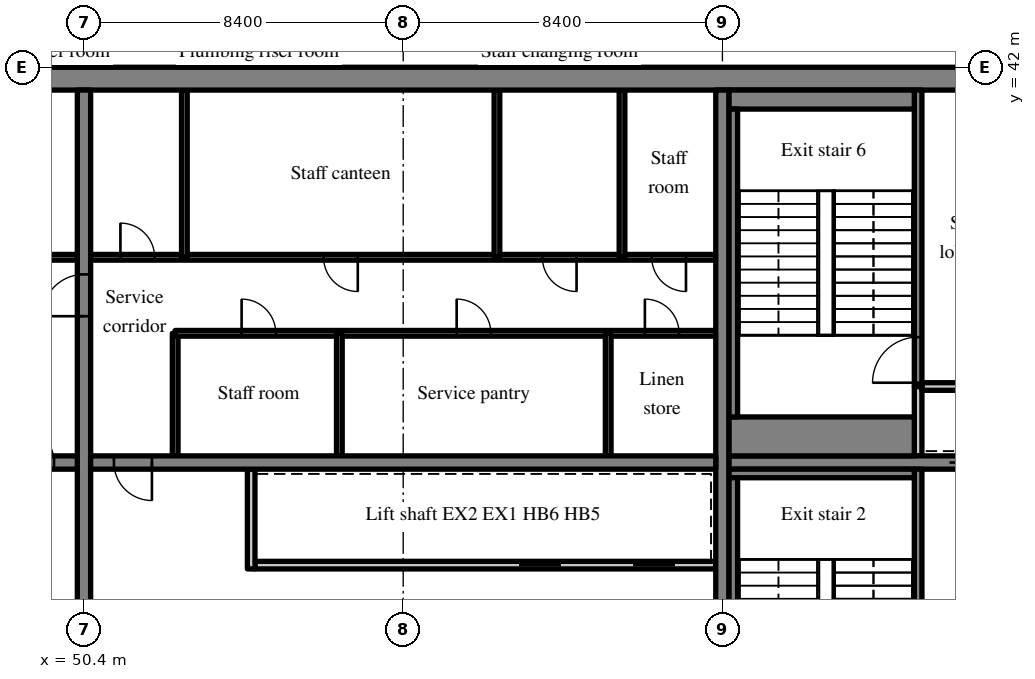
"""IFC4 building model, lengths in metres.
Left out: names, types, materials, properties, quantities, classifications, styles, units other than length and angle.
Written with IfcOpenShell. Run it as: python <this file> out.ifc"""

import sys

from ifc_helpers import new_model, si_unit, direction, frame, frame_2d, origin, place, context, subcontext, project, spatial, rectangle, extrude, source, transform, mapped, element, fill, save


model = new_model("IFC4")
c1 = context("Model", 3, precision=1e-05, world=origin(), true_north=direction((0.0, 1.0)))
c2 = subcontext(c1, "Body", "Model", "MODEL_VIEW")
j1 = project(units=[si_unit("LENGTHUNIT", "METRE"), si_unit("PLANEANGLEUNIT", "RADIAN")], contexts=[c1])
p1 = place(None, origin())
s1 = spatial("IfcSite", under=j1, at=p1, CompositionType="ELEMENT")
p2 = place(p1, origin())
s2 = spatial("IfcBuilding", under=s1, at=p2, CompositionType="ELEMENT")
p3 = place(p2, frame((0.0, 0.0, 260.8)))
s3 = spatial("IfcBuildingStorey", under=s2, at=p3, CompositionType="ELEMENT", Elevation=260.8)
m1 = source(origin(), c2, "Body", "SweptSolid", [
    extrude(rectangle(XDim=50.4, YDim=0.6, at=frame_2d((25.2, 0.0))), origin(), (0.0, 0.0, 1.0), 3.62),
])
p4 = place(p3, frame((25.2, 41.7, 0.0), z_axis=(0.0, 0.0, 1.0), x_axis=(1.0, 0.0, 0.0)))
e1 = element("IfcWall", 1, at=p4, inside=s3, PredefinedType="SHEAR", context=c2, shape_type="MappedRepresentation", body=[
    mapped(m1, transform((0.0, 0.0, 0.0), scale=1.0)),
])
m2 = source(origin(), c2, "Body", "SweptSolid", [
    extrude(rectangle(XDim=18.8, YDim=0.35, at=frame_2d((9.4, 0.0))), origin(), (0.0, 0.0, 1.0), 3.62),
])
p5 = place(p3, frame((50.4, 22.6, 0.0), z_axis=(0.0, 0.0, 1.0), x_axis=(0.0, 1.0, 0.0)))
e2 = element("IfcWall", 2, at=p5, inside=s3, PredefinedType="SHEAR", context=c2, shape_type="MappedRepresentation", body=[
    mapped(m2, transform((0.0, 0.0, 0.0), scale=1.0)),
])
m3 = source(origin(), c2, "Body", "SweptSolid", [
    extrude(rectangle(XDim=1.1, YDim=2.1, at=frame_2d((0.55, 1.05))), frame((0.0, 0.185, 0.0), z_axis=(0.0, -1.0, 0.0), x_axis=(1.0, 0.0, 0.0)), (0.0, 0.0, 1.0), 0.37),
])
p6 = place(p5, frame((12.85, 0.0, 0.0)))
e3 = element("IfcOpeningElement", 3, at=p6, cuts=e2, PredefinedType="OPENING", context=c2, shape_type="MappedRepresentation", body=[
    mapped(m3, transform((0.0, 0.0, 0.0), scale=1.0)),
])
p7 = place(p3, frame((67.2, 22.6, 0.0), z_axis=(0.0, 0.0, 1.0), x_axis=(0.0, 1.0, 0.0)))
e4 = element("IfcWall", 4, at=p7, inside=s3, PredefinedType="SHEAR", context=c2, shape_type="MappedRepresentation", body=[
    mapped(m2, transform((0.0, 0.0, 0.0), scale=1.0)),
])
m4 = source(origin(), c2, "Body", "SweptSolid", [
    extrude(rectangle(XDim=16.45, YDim=0.35, at=frame_2d((8.225, 0.0))), origin(), (0.0, 0.0, 1.0), 3.62),
])
p8 = place(p3, frame((33.775, 31.6, 0.0), z_axis=(0.0, 0.0, 1.0), x_axis=(1.0, 0.0, 0.0)))
e5 = element("IfcWall", 5, at=p8, inside=s3, PredefinedType="SHEAR", context=c2, shape_type="MappedRepresentation", body=[
    mapped(m4, transform((0.0, 0.0, 0.0), scale=1.0)),
])
m5 = source(origin(), c2, "Body", "SweptSolid", [
    extrude(rectangle(XDim=1.0, YDim=2.1, at=frame_2d((0.5, 1.05))), frame((0.0, 0.185, 0.0), z_axis=(0.0, -1.0, 0.0), x_axis=(1.0, 0.0, 0.0)), (0.0, 0.0, 1.0), 0.37),
])
p9 = place(p8, frame((14.837, 0.0, 0.0)))
e6 = element("IfcOpeningElement", 6, at=p9, cuts=e5, PredefinedType="OPENING", context=c2, shape_type="MappedRepresentation", body=[
    mapped(m5, transform((0.0, 0.0, 0.0), scale=1.0)),
])
m6 = source(origin(), c2, "Body", "SweptSolid", [
    extrude(rectangle(XDim=16.45, YDim=0.35, at=frame_2d((8.225, 0.0))), origin(), (0.0, 0.0, 1.0), 3.62),
])
p10 = place(p3, frame((50.575, 31.6, 0.0), z_axis=(0.0, 0.0, 1.0), x_axis=(1.0, 0.0, 0.0)))
e7 = element("IfcWall", 7, at=p10, inside=s3, PredefinedType="SHEAR", context=c2, shape_type="MappedRepresentation", body=[
    mapped(m6, transform((0.0, 0.0, 0.0), scale=1.0)),
])
p11 = place(p10, frame((0.613, 0.0, 0.0)))
e8 = element("IfcOpeningElement", 8, at=p11, cuts=e7, PredefinedType="OPENING", context=c2, shape_type="MappedRepresentation", body=[
    mapped(m5, transform((0.0, 0.0, 0.0), scale=1.0)),
])
m7 = source(origin(), c2, "Body", "SweptSolid", [
    extrude(rectangle(XDim=7.625, YDim=0.35, at=frame_2d((3.812, 0.0))), origin(), (0.0, 0.0, 1.0), 3.62),
])
p12 = place(p3, frame((67.375, 31.6, 0.0), z_axis=(0.0, 0.0, 1.0), x_axis=(1.0, 0.0, 0.0)))
e9 = element("IfcWall", 9, at=p12, inside=s3, PredefinedType="SHEAR", context=c2, shape_type="MappedRepresentation", body=[
    mapped(m7, transform((0.0, 0.0, 0.0), scale=1.0)),
])
p13 = place(p12, frame((5.8, 0.0, 0.0)))
e10 = element("IfcOpeningElement", 10, at=p13, cuts=e9, PredefinedType="OPENING", context=c2, shape_type="MappedRepresentation", body=[
    mapped(m3, transform((0.0, 0.0, 0.0), scale=1.0)),
])
m8 = source(origin(), c2, "Body", "SweptSolid", [
    extrude(rectangle(XDim=16.45, YDim=0.15, at=frame_2d((8.225, 0.0))), origin(), (0.0, 0.0, 1.0), 3.62),
])
p14 = place(p3, frame((33.775, 37.0, 0.0), z_axis=(0.0, 0.0, 1.0), x_axis=(1.0, 0.0, 0.0)))
e11 = element("IfcWall", 11, at=p14, inside=s3, PredefinedType="PARTITIONING", context=c2, shape_type="MappedRepresentation", body=[
    mapped(m8, transform((0.0, 0.0, 0.0), scale=1.0)),
])
m9 = source(origin(), c2, "Body", "SweptSolid", [
    extrude(rectangle(XDim=0.9, YDim=2.1, at=frame_2d((0.45, 1.05))), frame((0.0, 0.085, 0.0), z_axis=(0.0, -1.0, 0.0), x_axis=(1.0, 0.0, 0.0)), (0.0, 0.0, 1.0), 0.17),
])
p15 = place(p14, frame((3.251, 0.0, 0.0)))
e12 = element("IfcOpeningElement", 12, at=p15, cuts=e11, PredefinedType="OPENING", context=c2, shape_type="MappedRepresentation", body=[
    mapped(m9, transform((0.0, 0.0, 0.0), scale=1.0)),
])
p16 = place(p14, frame((8.186, 0.0, 0.0)))
e13 = element("IfcOpeningElement", 13, at=p16, cuts=e11, PredefinedType="OPENING", context=c2, shape_type="MappedRepresentation", body=[
    mapped(m9, transform((0.0, 0.0, 0.0), scale=1.0)),
])
p17 = place(p14, frame((11.476, 0.0, 0.0)))
e14 = element("IfcOpeningElement", 14, at=p17, cuts=e11, PredefinedType="OPENING", context=c2, shape_type="MappedRepresentation", body=[
    mapped(m9, transform((0.0, 0.0, 0.0), scale=1.0)),
])
p18 = place(p14, frame((14.766, 0.0, 0.0)))
e15 = element("IfcOpeningElement", 15, at=p18, cuts=e11, PredefinedType="OPENING", context=c2, shape_type="MappedRepresentation", body=[
    mapped(m9, transform((0.0, 0.0, 0.0), scale=1.0)),
])
m10 = source(origin(), c2, "Body", "SweptSolid", [
    extrude(rectangle(XDim=12.125, YDim=0.2, at=frame_2d((6.062, 0.0))), origin(), (0.0, 0.0, 1.0), 3.62),
])
p19 = place(p3, frame((67.025, 28.9, 0.0), z_axis=(0.0, 0.0, 1.0), x_axis=(-1.0, 0.0, 0.0)))
e16 = element("IfcWall", 16, at=p19, inside=s3, PredefinedType="SOLIDWALL", context=c2, shape_type="MappedRepresentation", body=[
    mapped(m10, transform((0.0, 0.0, 0.0), scale=1.0)),
])
m11 = source(origin(), c2, "Body", "SweptSolid", [
    extrude(rectangle(XDim=1.1, YDim=2.1, at=frame_2d((0.55, 1.05))), frame((0.0, 0.11, 0.0), z_axis=(0.0, -1.0, 0.0), x_axis=(1.0, 0.0, 0.0)), (0.0, 0.0, 1.0), 0.22),
])
p20 = place(p19, frame((1.075, 0.0, 0.0)))
e17 = element("IfcOpeningElement", 17, at=p20, cuts=e16, PredefinedType="OPENING", context=c2, shape_type="MappedRepresentation", body=[
    mapped(m11, transform((0.0, 0.0, 0.0), scale=1.0)),
])
p21 = place(p19, frame((4.075, 0.0, 0.0)))
e18 = element("IfcOpeningElement", 18, at=p21, cuts=e16, PredefinedType="OPENING", context=c2, shape_type="MappedRepresentation", body=[
    mapped(m11, transform((0.0, 0.0, 0.0), scale=1.0)),
])
m12 = source(origin(), c2, "Body", "SweptSolid", [
    extrude(rectangle(XDim=2.625, YDim=0.2, at=frame_2d((1.312, 0.0))), origin(), (0.0, 0.0, 1.0), 3.62),
])
p22 = place(p3, frame((54.8, 28.8, 0.0), z_axis=(0.0, 0.0, 1.0), x_axis=(0.0, 1.0, 0.0)))
e19 = element("IfcWall", 19, at=p22, inside=s3, PredefinedType="SOLIDWALL", context=c2, shape_type="MappedRepresentation", body=[
    mapped(m12, transform((0.0, 0.0, 0.0), scale=1.0)),
])
m13 = source(origin(), c2, "Body", "SweptSolid", [
    extrude(rectangle(XDim=3.225, YDim=0.15, at=frame_2d((1.613, 0.0))), origin(), (0.0, 0.0, 1.0), 3.62),
])
p23 = place(p3, frame((52.8, 31.775, 0.0), z_axis=(0.0, 0.0, 1.0), x_axis=(0.0, 1.0, 0.0)))
e20 = element("IfcWall", 20, at=p23, inside=s3, PredefinedType="PARTITIONING", context=c2, shape_type="MappedRepresentation", body=[
    mapped(m13, transform((0.0, 0.0, 0.0), scale=1.0)),
])
m14 = source(origin(), c2, "Body", "SweptSolid", [
    extrude(rectangle(XDim=14.225, YDim=0.15, at=frame_2d((7.112, 0.0))), origin(), (0.0, 0.0, 1.0), 3.62),
])
p24 = place(p3, frame((67.025, 35.0, 0.0), z_axis=(0.0, 0.0, 1.0), x_axis=(-1.0, 0.0, 0.0)))
e21 = element("IfcWall", 21, at=p24, inside=s3, PredefinedType="PARTITIONING", context=c2, shape_type="MappedRepresentation", body=[
    mapped(m14, transform((0.0, 0.0, 0.0), scale=1.0)),
])
p25 = place(p24, frame((0.965, 0.0, 0.0)))
e22 = element("IfcOpeningElement", 22, at=p25, cuts=e21, PredefinedType="OPENING", context=c2, shape_type="MappedRepresentation", body=[
    mapped(m9, transform((0.0, 0.0, 0.0), scale=1.0)),
])
p26 = place(p24, frame((5.918, 0.0, 0.0)))
e23 = element("IfcOpeningElement", 23, at=p26, cuts=e21, PredefinedType="OPENING", context=c2, shape_type="MappedRepresentation", body=[
    mapped(m9, transform((0.0, 0.0, 0.0), scale=1.0)),
])
p27 = place(p24, frame((11.577, 0.0, 0.0)))
e24 = element("IfcOpeningElement", 24, at=p27, cuts=e21, PredefinedType="OPENING", context=c2, shape_type="MappedRepresentation", body=[
    mapped(m9, transform((0.0, 0.0, 0.0), scale=1.0)),
])
m15 = source(origin(), c2, "Body", "SweptSolid", [
    extrude(rectangle(XDim=16.45, YDim=0.15, at=frame_2d((8.225, 0.0))), origin(), (0.0, 0.0, 1.0), 3.62),
])
p28 = place(p3, frame((67.025, 37.0, 0.0), z_axis=(0.0, 0.0, 1.0), x_axis=(-1.0, 0.0, 0.0)))
e25 = element("IfcWall", 25, at=p28, inside=s3, PredefinedType="PARTITIONING", context=c2, shape_type="MappedRepresentation", body=[
    mapped(m15, transform((0.0, 0.0, 0.0), scale=1.0)),
])
p29 = place(p28, frame((0.784, 0.0, 0.0)))
e26 = element("IfcOpeningElement", 26, at=p29, cuts=e25, PredefinedType="OPENING", context=c2, shape_type="MappedRepresentation", body=[
    mapped(m9, transform((0.0, 0.0, 0.0), scale=1.0)),
])
p30 = place(p28, frame((3.663, 0.0, 0.0)))
e27 = element("IfcOpeningElement", 27, at=p30, cuts=e25, PredefinedType="OPENING", context=c2, shape_type="MappedRepresentation", body=[
    mapped(m9, transform((0.0, 0.0, 0.0), scale=1.0)),
])
p31 = place(p28, frame((9.42, 0.0, 0.0)))
e28 = element("IfcOpeningElement", 28, at=p31, cuts=e25, PredefinedType="OPENING", context=c2, shape_type="MappedRepresentation", body=[
    mapped(m9, transform((0.0, 0.0, 0.0), scale=1.0)),
])
p32 = place(p28, frame((14.766, 0.0, 0.0)))
e29 = element("IfcOpeningElement", 29, at=p32, cuts=e25, PredefinedType="OPENING", context=c2, shape_type="MappedRepresentation", body=[
    mapped(m9, transform((0.0, 0.0, 0.0), scale=1.0)),
])
for number, where, z_axis, x_axis in (
    (30, (64.195, 31.775, 0.0), (0.0, 0.0, 1.0), (0.0, 1.0, 0.0)),
    (31, (57.12, 31.775, 0.0), (0.0, 0.0, 1.0), (0.0, 1.0, 0.0)),
):
    element("IfcWall", number, at=place(p3, frame(where, z_axis=z_axis, x_axis=x_axis)), inside=s3, PredefinedType="PARTITIONING", context=c2, shape_type="MappedRepresentation", body=[
        mapped(m13, transform((0.0, 0.0, 0.0), scale=1.0)),
    ])
m16 = source(origin(), c2, "Body", "SweptSolid", [
    extrude(rectangle(XDim=4.4, YDim=0.15, at=frame_2d((2.2, 0.0))), origin(), (0.0, 0.0, 1.0), 3.62),
])
for number, where, z_axis, x_axis in (
    (32, (64.558, 37.0, 0.0), (0.0, 0.0, 1.0), (0.0, 1.0, 0.0)),
    (33, (61.267, 37.0, 0.0), (0.0, 0.0, 1.0), (0.0, 1.0, 0.0)),
    (34, (53.042, 37.0, 0.0), (0.0, 0.0, 1.0), (0.0, 1.0, 0.0)),
):
    element("IfcWall", number, at=place(p3, frame(where, z_axis=z_axis, x_axis=x_axis)), inside=s3, PredefinedType="PARTITIONING", context=c2, shape_type="MappedRepresentation", body=[
        mapped(m16, transform((0.0, 0.0, 0.0), scale=1.0)),
    ])
m17 = source(origin(), c2, "Body", "SweptSolid", [
    extrude(rectangle(XDim=8.825, YDim=0.2, at=frame_2d((4.413, 0.0))), origin(), (0.0, 0.0, 1.0), 3.62),
])
p33 = place(p3, frame((72.35, 22.6, 0.0), z_axis=(0.0, 0.0, 1.0), x_axis=(0.0, 1.0, 0.0)))
e35 = element("IfcWall", 35, at=p33, inside=s3, PredefinedType="SOLIDWALL", context=c2, shape_type="MappedRepresentation", body=[
    mapped(m17, transform((0.0, 0.0, 0.0), scale=1.0)),
])
m18 = source(origin(), c2, "Body", "SweptSolid", [
    extrude(rectangle(XDim=1.2, YDim=2.1, at=frame_2d((0.6, 1.05))), frame((0.0, 0.11, 0.0), z_axis=(0.0, -1.0, 0.0), x_axis=(1.0, 0.0, 0.0)), (0.0, 0.0, 1.0), 0.22),
])
p34 = place(p33, frame((1.0, 0.0, 0.0)))
e36 = element("IfcOpeningElement", 36, at=p34, cuts=e35, PredefinedType="OPENING", context=c2, shape_type="MappedRepresentation", body=[
    mapped(m18, transform((0.0, 0.0, 0.0), scale=1.0)),
])
m19 = source(origin(), c2, "Body", "SweptSolid", [
    extrude(rectangle(XDim=1.825, YDim=0.2, at=frame_2d((0.913, 0.0))), origin(), (0.0, 0.0, 1.0), 3.62),
])
p35 = place(p3, frame((72.35, 31.775, 0.0), z_axis=(0.0, 0.0, 1.0), x_axis=(0.0, 1.0, 0.0)))
e37 = element("IfcWall", 37, at=p35, inside=s3, PredefinedType="SOLIDWALL", context=c2, shape_type="MappedRepresentation", body=[
    mapped(m19, transform((0.0, 0.0, 0.0), scale=1.0)),
])
m20 = source(origin(), c2, "Body", "SweptSolid", [
    extrude(rectangle(XDim=2.55, YDim=0.2, at=frame_2d((1.275, 0.0))), origin(), (0.0, 0.0, 1.0), 3.62),
])
p36 = place(p3, frame((72.45, 33.6, 0.0), z_axis=(0.0, 0.0, 1.0), x_axis=(1.0, 0.0, 0.0)))
e38 = element("IfcWall", 38, at=p36, inside=s3, PredefinedType="SOLIDWALL", context=c2, shape_type="MappedRepresentation", body=[
    mapped(m20, transform((0.0, 0.0, 0.0), scale=1.0)),
])
m21 = source(origin(), c2, "Body", "SweptSolid", [
    extrude(rectangle(XDim=7.8, YDim=0.2, at=frame_2d((3.9, 0.0))), origin(), (0.0, 0.0, 1.0), 3.62),
])
p37 = place(p3, frame((72.35, 33.6, 0.0), z_axis=(0.0, 0.0, 1.0), x_axis=(0.0, 1.0, 0.0)))
e39 = element("IfcWall", 39, at=p37, inside=s3, PredefinedType="SOLIDWALL", context=c2, shape_type="MappedRepresentation", body=[
    mapped(m21, transform((0.0, 0.0, 0.0), scale=1.0)),
])
p38 = place(p37, frame((0.1, 0.0, 0.0)))
e40 = element("IfcOpeningElement", 40, at=p38, cuts=e39, PredefinedType="OPENING", context=c2, shape_type="MappedRepresentation", body=[
    mapped(m18, transform((0.0, 0.0, 0.0), scale=1.0)),
])
m22 = source(origin(), c2, "Body", "SweptSolid", [
    extrude(rectangle(XDim=4.875, YDim=0.225, at=frame_2d((2.438, 0.0))), origin(), (0.0, 0.0, 1.0), 3.62),
])
p39 = place(p3, frame((67.375, 31.312, 0.0), z_axis=(0.0, 0.0, 1.0), x_axis=(1.0, 0.0, 0.0)))
e41 = element("IfcWall", 41, at=p39, inside=s3, PredefinedType="SOLIDWALL", context=c2, shape_type="MappedRepresentation", body=[
    mapped(m22, transform((0.0, 0.0, 0.0), scale=1.0)),
])
m23 = source(origin(), c2, "Body", "SweptSolid", [
    extrude(rectangle(XDim=8.1, YDim=0.225, at=frame_2d((4.05, 0.0))), origin(), (0.0, 0.0, 1.0), 3.62),
])
p40 = place(p3, frame((67.487, 23.1, 0.0), z_axis=(0.0, 0.0, 1.0), x_axis=(0.0, 1.0, 0.0)))
e42 = element("IfcWall", 42, at=p40, inside=s3, PredefinedType="SOLIDWALL", context=c2, shape_type="MappedRepresentation", body=[
    mapped(m23, transform((0.0, 0.0, 0.0), scale=1.0)),
])
m24 = source(origin(), c2, "Body", "SweptSolid", [
    extrude(rectangle(XDim=4.875, YDim=0.5, at=frame_2d((2.438, 0.0))), origin(), (0.0, 0.0, 1.0), 3.62),
])
p41 = place(p3, frame((67.375, 41.15, 0.0), z_axis=(0.0, 0.0, 1.0), x_axis=(1.0, 0.0, 0.0)))
e43 = element("IfcWall", 43, at=p41, inside=s3, PredefinedType="SOLIDWALL", context=c2, shape_type="MappedRepresentation", body=[
    mapped(m24, transform((0.0, 0.0, 0.0), scale=1.0)),
])
m25 = source(origin(), c2, "Body", "SweptSolid", [
    extrude(rectangle(XDim=4.875, YDim=1.025, at=frame_2d((2.438, 0.0))), origin(), (0.0, 0.0, 1.0), 3.62),
])
p42 = place(p3, frame((67.375, 32.287, 0.0), z_axis=(0.0, 0.0, 1.0), x_axis=(1.0, 0.0, 0.0)))
e44 = element("IfcWall", 44, at=p42, inside=s3, PredefinedType="SOLIDWALL", context=c2, shape_type="MappedRepresentation", body=[
    mapped(m25, transform((0.0, 0.0, 0.0), scale=1.0)),
])
p43 = place(p3, frame((67.487, 32.8, 0.0), z_axis=(0.0, 0.0, 1.0), x_axis=(0.0, 1.0, 0.0)))
e45 = element("IfcWall", 45, at=p43, inside=s3, PredefinedType="SOLIDWALL", context=c2, shape_type="MappedRepresentation", body=[
    mapped(m23, transform((0.0, 0.0, 0.0), scale=1.0)),
])
m26 = source(origin(), c2, "Body", "SweptSolid", [
    extrude(rectangle(XDim=1.0, YDim=2.1, at=frame_2d((0.5, 1.05))), frame((0.0, 0.025, 0.0), z_axis=(0.0, -1.0, 0.0), x_axis=(1.0, 0.0, 0.0)), (0.0, 0.0, 1.0), 0.05),
])
p44 = place(p9, origin())
e46 = element("IfcDoor", 46, at=p44, inside=s3, OperationType="SINGLE_SWING_LEFT", PredefinedType="DOOR", context=c2, shape_type="MappedRepresentation", body=[
    mapped(m26, transform((0.0, 0.0, 0.0), scale=1.0)),
])
fill(e6, e46)
p45 = place(p11, origin())
e47 = element("IfcDoor", 47, at=p45, inside=s3, OperationType="SINGLE_SWING_RIGHT", PredefinedType="DOOR", context=c2, shape_type="MappedRepresentation", body=[
    mapped(m26, transform((0.0, 0.0, 0.0), scale=1.0)),
])
fill(e8, e47)
m27 = source(origin(), c2, "Body", "SweptSolid", [
    extrude(rectangle(XDim=1.1, YDim=2.1, at=frame_2d((0.55, 1.05))), frame((0.0, 0.025, 0.0), z_axis=(0.0, -1.0, 0.0), x_axis=(1.0, 0.0, 0.0)), (0.0, 0.0, 1.0), 0.05),
])
p46 = place(p20, origin())
e48 = element("IfcDoor", 48, at=p46, inside=s3, OperationType="SLIDING_TO_RIGHT", PredefinedType="DOOR", context=c2, shape_type="MappedRepresentation", body=[
    mapped(m27, transform((0.0, 0.0, 0.0), scale=1.0)),
])
fill(e17, e48)
p47 = place(p21, origin())
e49 = element("IfcDoor", 49, at=p47, inside=s3, OperationType="SLIDING_TO_LEFT", PredefinedType="DOOR", context=c2, shape_type="MappedRepresentation", body=[
    mapped(m27, transform((0.0, 0.0, 0.0), scale=1.0)),
])
fill(e18, e49)
m28 = source(origin(), c2, "Body", "SweptSolid", [
    extrude(rectangle(XDim=0.9, YDim=2.1, at=frame_2d((0.45, 1.05))), frame((0.0, 0.025, 0.0), z_axis=(0.0, -1.0, 0.0), x_axis=(1.0, 0.0, 0.0)), (0.0, 0.0, 1.0), 0.05),
])
p48 = place(p25, origin())
e50 = element("IfcDoor", 50, at=p48, inside=s3, OperationType="SINGLE_SWING_RIGHT", PredefinedType="DOOR", context=c2, shape_type="MappedRepresentation", body=[
    mapped(m28, transform((0.0, 0.0, 0.0), scale=1.0)),
])
fill(e22, e50)
p49 = place(p26, origin())
e51 = element("IfcDoor", 51, at=p49, inside=s3, OperationType="SINGLE_SWING_RIGHT", PredefinedType="DOOR", context=c2, shape_type="MappedRepresentation", body=[
    mapped(m28, transform((0.0, 0.0, 0.0), scale=1.0)),
])
fill(e23, e51)
p50 = place(p27, origin())
e52 = element("IfcDoor", 52, at=p50, inside=s3, OperationType="SINGLE_SWING_RIGHT", PredefinedType="DOOR", context=c2, shape_type="MappedRepresentation", body=[
    mapped(m28, transform((0.0, 0.0, 0.0), scale=1.0)),
])
fill(e24, e52)
p51 = place(p29, origin())
e53 = element("IfcDoor", 53, at=p51, inside=s3, OperationType="SINGLE_SWING_LEFT", PredefinedType="DOOR", context=c2, shape_type="MappedRepresentation", body=[
    mapped(m28, transform((0.0, 0.0, 0.0), scale=1.0)),
])
fill(e26, e53)
p52 = place(p30, origin())
e54 = element("IfcDoor", 54, at=p52, inside=s3, OperationType="SINGLE_SWING_LEFT", PredefinedType="DOOR", context=c2, shape_type="MappedRepresentation", body=[
    mapped(m28, transform((0.0, 0.0, 0.0), scale=1.0)),
])
fill(e27, e54)
p53 = place(p31, origin())
e55 = element("IfcDoor", 55, at=p53, inside=s3, OperationType="SINGLE_SWING_LEFT", PredefinedType="DOOR", context=c2, shape_type="MappedRepresentation", body=[
    mapped(m28, transform((0.0, 0.0, 0.0), scale=1.0)),
])
fill(e28, e55)
p54 = place(p32, origin())
e56 = element("IfcDoor", 56, at=p54, inside=s3, OperationType="SINGLE_SWING_RIGHT", PredefinedType="DOOR", context=c2, shape_type="MappedRepresentation", body=[
    mapped(m28, transform((0.0, 0.0, 0.0), scale=1.0)),
])
fill(e29, e56)
p55 = place(p13, origin())
e57 = element("IfcDoor", 57, at=p55, inside=s3, OperationType="SLIDING_TO_LEFT", PredefinedType="DOOR", context=c2, shape_type="MappedRepresentation", body=[
    mapped(m27, transform((0.0, 0.0, 0.0), scale=1.0)),
])
fill(e10, e57)
m29 = source(origin(), c2, "Body", "SweptSolid", [
    extrude(rectangle(XDim=1.2, YDim=2.1, at=frame_2d((0.6, 1.05))), frame((0.0, 0.025, 0.0), z_axis=(0.0, -1.0, 0.0), x_axis=(1.0, 0.0, 0.0)), (0.0, 0.0, 1.0), 0.05),
])
p56 = place(p38, origin())
e58 = element("IfcDoor", 58, at=p56, inside=s3, OperationType="SINGLE_SWING_LEFT", PredefinedType="DOOR", context=c2, shape_type="MappedRepresentation", body=[
    mapped(m29, transform((0.0, 0.0, 0.0), scale=1.0)),
])
fill(e40, e58)
p57 = place(p6, origin())
e59 = element("IfcDoor", 59, at=p57, inside=s3, OperationType="SINGLE_SWING_LEFT", PredefinedType="DOOR", context=c2, shape_type="MappedRepresentation", body=[
    mapped(m27, transform((0.0, 0.0, 0.0), scale=1.0)),
])
fill(e3, e59)
save(model, sys.argv[1])
